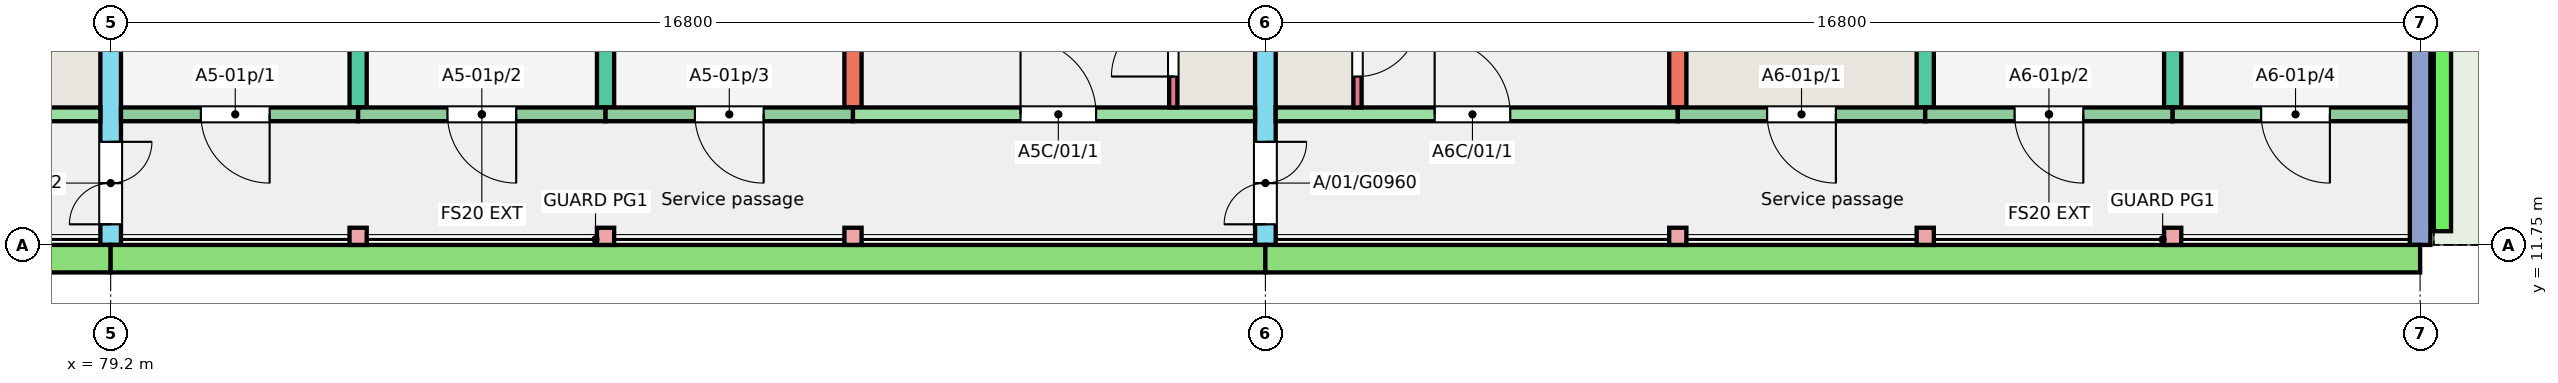
"""IFC4 building model, lengths in metres.
Left out: names, types, materials, properties, quantities, classifications, styles, units other than length and angle.
Written with IfcOpenShell. Run it as: python <this file> out.ifc"""

import sys

from ifc_helpers import new_model, si_unit, direction, frame, frame_2d, origin, origin_2d, place, context, subcontext, project, spatial, rectangle, extrude, element, fill, save


model = new_model("IFC4")
c1 = context("Model", 3, precision=1e-05, world=origin(), true_north=direction((0.0, 1.0)))
c2 = subcontext(c1, "Body", "Model", "MODEL_VIEW")
j1 = project(units=[si_unit("LENGTHUNIT", "METRE"), si_unit("PLANEANGLEUNIT", "RADIAN")], contexts=[c1])
p1 = place(None, origin())
s1 = spatial("IfcSite", under=j1, at=p1, CompositionType="ELEMENT")
p2 = place(p1, origin())
s2 = spatial("IfcBuilding", under=s1, at=p2, CompositionType="ELEMENT")
p3 = place(p2, frame((0.0, 0.0, 3.0)))
s3 = spatial("IfcBuildingStorey", under=s2, at=p3, CompositionType="ELEMENT", Elevation=3.0)
p4 = place(p3, frame((79.2, 11.75, 0.0), z_axis=(0.0, 0.0, 1.0), x_axis=(0.0, 1.0, 0.0)))
e1 = element("IfcWall", 1, at=p4, inside=s3, PredefinedType="SHEAR", context=c2, shape_type="SweptSolid", body=[
    extrude(rectangle(XDim=11.0, YDim=0.3, at=frame_2d((5.5, 0.0))), origin(), (0.0, 0.0, 1.0), 3.0),
])
p5 = place(p4, frame((0.3, 0.0, 0.0)))
e2 = element("IfcOpeningElement", 2, at=p5, cuts=e1, PredefinedType="OPENING", context=c2, shape_type="SweptSolid", body=[
    extrude(rectangle(XDim=1.2, YDim=2.1, at=frame_2d((0.6, 1.05))), frame((0.0, 0.16, 0.0), z_axis=(0.0, -1.0, 0.0), x_axis=(1.0, 0.0, 0.0)), (0.0, 0.0, 1.0), 0.32),
])
for number, where, z_axis, x_axis in (
    (3, (82.8, 13.75, 0.0), (0.0, 0.0, 1.0), (0.0, 1.0, 0.0)),
    (4, (86.4, 13.75, 0.0), (0.0, 0.0, 1.0), (0.0, 1.0, 0.0)),
    (5, (90.0, 13.75, 0.0), (0.0, 0.0, 1.0), (0.0, 1.0, 0.0)),
):
    element("IfcWall", number, at=place(p3, frame(where, z_axis=z_axis, x_axis=x_axis)), inside=s3, PredefinedType="SHEAR", context=c2, shape_type="SweptSolid", body=[
        extrude(rectangle(XDim=9.0, YDim=0.25, at=frame_2d((4.5, 0.0))), origin(), (0.0, 0.0, 1.0), 3.0),
    ])
p6 = place(p3, frame((96.0, 11.75, 0.0), z_axis=(0.0, 0.0, 1.0), x_axis=(0.0, 1.0, 0.0)))
e6 = element("IfcWall", 6, at=p6, inside=s3, PredefinedType="SHEAR", context=c2, shape_type="SweptSolid", body=[
    extrude(rectangle(XDim=11.0, YDim=0.3, at=frame_2d((5.5, 0.0))), origin(), (0.0, 0.0, 1.0), 3.0),
])
p7 = place(p6, frame((0.3, 0.0, 0.0)))
e7 = element("IfcOpeningElement", 7, at=p7, cuts=e6, PredefinedType="OPENING", context=c2, shape_type="SweptSolid", body=[
    extrude(rectangle(XDim=1.2, YDim=2.1, at=frame_2d((0.6, 1.05))), frame((0.0, 0.16, 0.0), z_axis=(0.0, -1.0, 0.0), x_axis=(1.0, 0.0, 0.0)), (0.0, 0.0, 1.0), 0.32),
])
for number, where, z_axis, x_axis in (
    (8, (102.0, 13.75, 0.0), (0.0, 0.0, 1.0), (0.0, 1.0, 0.0)),
    (9, (105.6, 13.75, 0.0), (0.0, 0.0, 1.0), (0.0, 1.0, 0.0)),
    (10, (109.2, 13.75, 0.0), (0.0, 0.0, 1.0), (0.0, 1.0, 0.0)),
):
    element("IfcWall", number, at=place(p3, frame(where, z_axis=z_axis, x_axis=x_axis)), inside=s3, PredefinedType="SHEAR", context=c2, shape_type="SweptSolid", body=[
        extrude(rectangle(XDim=9.0, YDim=0.25, at=frame_2d((4.5, 0.0))), origin(), (0.0, 0.0, 1.0), 3.0),
    ])
p8 = place(p3, frame((112.8, 11.75, 0.0), z_axis=(0.0, 0.0, 1.0), x_axis=(0.0, 1.0, 0.0)))
e11 = element("IfcWall", 11, at=p8, inside=s3, PredefinedType="SHEAR", context=c2, shape_type="SweptSolid", body=[
    extrude(rectangle(XDim=11.0, YDim=0.3, at=frame_2d((5.5, 0.0))), origin(), (0.0, 0.0, 1.0), 3.0),
])
p9 = place(p3, frame((73.2, 13.65, 0.0), z_axis=(0.0, 0.0, 1.0), x_axis=(1.0, 0.0, 0.0)))
e12 = element("IfcWall", 12, at=p9, inside=s3, PredefinedType="SHEAR", context=c2, shape_type="SweptSolid", body=[
    extrude(rectangle(XDim=5.85, YDim=0.2, at=frame_2d((2.925, 0.0))), origin(), (0.0, 0.0, 1.0), 3.0),
])
p10 = place(p9, frame((2.438, 0.0, 0.0)))
e13 = element("IfcOpeningElement", 13, at=p10, cuts=e12, PredefinedType="OPENING", context=c2, shape_type="SweptSolid", body=[
    extrude(rectangle(XDim=1.1, YDim=2.1, at=frame_2d((0.55, 1.05))), frame((0.0, 0.11, 0.0), z_axis=(0.0, -1.0, 0.0), x_axis=(1.0, 0.0, 0.0)), (0.0, 0.0, 1.0), 0.22),
])
p11 = place(p3, frame((79.35, 13.65, 0.0), z_axis=(0.0, 0.0, 1.0), x_axis=(1.0, 0.0, 0.0)))
e14 = element("IfcWall", 14, at=p11, inside=s3, PredefinedType="SOLIDWALL", context=c2, shape_type="SweptSolid", body=[
    extrude(rectangle(XDim=3.45, YDim=0.2, at=frame_2d((1.725, 0.0))), origin(), (0.0, 0.0, 1.0), 3.0),
])
p12 = place(p11, frame((1.163, 0.0, 0.0)))
e15 = element("IfcOpeningElement", 15, at=p12, cuts=e14, PredefinedType="OPENING", context=c2, shape_type="SweptSolid", body=[
    extrude(rectangle(XDim=1.0, YDim=2.1, at=frame_2d((0.5, 1.05))), frame((0.0, 0.11, 0.0), z_axis=(0.0, -1.0, 0.0), x_axis=(1.0, 0.0, 0.0)), (0.0, 0.0, 1.0), 0.22),
])
p13 = place(p3, frame((82.8, 13.65, 0.0), z_axis=(0.0, 0.0, 1.0), x_axis=(1.0, 0.0, 0.0)))
e16 = element("IfcWall", 16, at=p13, inside=s3, PredefinedType="SOLIDWALL", context=c2, shape_type="SweptSolid", body=[
    extrude(rectangle(XDim=3.6, YDim=0.2, at=frame_2d((1.8, 0.0))), origin(), (0.0, 0.0, 1.0), 3.0),
])
p14 = place(p13, frame((1.3, 0.0, 0.0)))
e17 = element("IfcOpeningElement", 17, at=p14, cuts=e16, PredefinedType="OPENING", context=c2, shape_type="SweptSolid", body=[
    extrude(rectangle(XDim=1.0, YDim=2.1, at=frame_2d((0.5, 1.05))), frame((0.0, 0.11, 0.0), z_axis=(0.0, -1.0, 0.0), x_axis=(1.0, 0.0, 0.0)), (0.0, 0.0, 1.0), 0.22),
])
p15 = place(p3, frame((86.4, 13.65, 0.0), z_axis=(0.0, 0.0, 1.0), x_axis=(1.0, 0.0, 0.0)))
e18 = element("IfcWall", 18, at=p15, inside=s3, PredefinedType="SOLIDWALL", context=c2, shape_type="SweptSolid", body=[
    extrude(rectangle(XDim=3.6, YDim=0.2, at=frame_2d((1.8, 0.0))), origin(), (0.0, 0.0, 1.0), 3.0),
])
p16 = place(p15, frame((1.3, 0.0, 0.0)))
e19 = element("IfcOpeningElement", 19, at=p16, cuts=e18, PredefinedType="OPENING", context=c2, shape_type="SweptSolid", body=[
    extrude(rectangle(XDim=1.0, YDim=2.1, at=frame_2d((0.5, 1.05))), frame((0.0, 0.11, 0.0), z_axis=(0.0, -1.0, 0.0), x_axis=(1.0, 0.0, 0.0)), (0.0, 0.0, 1.0), 0.22),
])
p17 = place(p3, frame((90.0, 13.65, 0.0), z_axis=(0.0, 0.0, 1.0), x_axis=(1.0, 0.0, 0.0)))
e20 = element("IfcWall", 20, at=p17, inside=s3, PredefinedType="SHEAR", context=c2, shape_type="SweptSolid", body=[
    extrude(rectangle(XDim=5.85, YDim=0.2, at=frame_2d((2.925, 0.0))), origin(), (0.0, 0.0, 1.0), 3.0),
])
p18 = place(p17, frame((2.438, 0.0, 0.0)))
e21 = element("IfcOpeningElement", 21, at=p18, cuts=e20, PredefinedType="OPENING", context=c2, shape_type="SweptSolid", body=[
    extrude(rectangle(XDim=1.1, YDim=2.1, at=frame_2d((0.55, 1.05))), frame((0.0, 0.11, 0.0), z_axis=(0.0, -1.0, 0.0), x_axis=(1.0, 0.0, 0.0)), (0.0, 0.0, 1.0), 0.22),
])
p19 = place(p3, frame((94.66, 13.75, 0.0), z_axis=(0.0, 0.0, 1.0), x_axis=(0.0, 1.0, 0.0)))
e22 = element("IfcWall", 22, at=p19, inside=s3, PredefinedType="SHEAR", context=c2, shape_type="SweptSolid", body=[
    extrude(rectangle(XDim=1.72, YDim=0.12, at=frame_2d((0.86, 0.0))), origin(), (0.0, 0.0, 1.0), 3.0),
])
p20 = place(p19, frame((0.45, 0.0, 0.0)))
e23 = element("IfcOpeningElement", 23, at=p20, cuts=e22, PredefinedType="OPENING", context=c2, shape_type="SweptSolid", body=[
    extrude(rectangle(XDim=0.9, YDim=2.1, at=frame_2d((0.45, 1.05))), frame((0.0, 0.07, 0.0), z_axis=(0.0, -1.0, 0.0), x_axis=(1.0, 0.0, 0.0)), (0.0, 0.0, 1.0), 0.14),
])
p21 = place(p3, frame((96.15, 13.65, 0.0), z_axis=(0.0, 0.0, 1.0), x_axis=(1.0, 0.0, 0.0)))
e24 = element("IfcWall", 24, at=p21, inside=s3, PredefinedType="SHEAR", context=c2, shape_type="SweptSolid", body=[
    extrude(rectangle(XDim=5.85, YDim=0.2, at=frame_2d((2.925, 0.0))), origin(), (0.0, 0.0, 1.0), 3.0),
])
p22 = place(p21, frame((2.312, 0.0, 0.0)))
e25 = element("IfcOpeningElement", 25, at=p22, cuts=e24, PredefinedType="OPENING", context=c2, shape_type="SweptSolid", body=[
    extrude(rectangle(XDim=1.1, YDim=2.1, at=frame_2d((0.55, 1.05))), frame((0.0, 0.11, 0.0), z_axis=(0.0, -1.0, 0.0), x_axis=(1.0, 0.0, 0.0)), (0.0, 0.0, 1.0), 0.22),
])
p23 = place(p3, frame((97.34, 13.75, 0.0), z_axis=(0.0, 0.0, 1.0), x_axis=(0.0, 1.0, 0.0)))
e26 = element("IfcWall", 26, at=p23, inside=s3, PredefinedType="SHEAR", context=c2, shape_type="SweptSolid", body=[
    extrude(rectangle(XDim=1.72, YDim=0.12, at=frame_2d((0.86, 0.0))), origin(), (0.0, 0.0, 1.0), 3.0),
])
p24 = place(p23, frame((0.45, 0.0, 0.0)))
e27 = element("IfcOpeningElement", 27, at=p24, cuts=e26, PredefinedType="OPENING", context=c2, shape_type="SweptSolid", body=[
    extrude(rectangle(XDim=0.9, YDim=2.1, at=frame_2d((0.45, 1.05))), frame((0.0, 0.07, 0.0), z_axis=(0.0, -1.0, 0.0), x_axis=(1.0, 0.0, 0.0)), (0.0, 0.0, 1.0), 0.14),
])
p25 = place(p3, frame((102.0, 13.65, 0.0), z_axis=(0.0, 0.0, 1.0), x_axis=(1.0, 0.0, 0.0)))
e28 = element("IfcWall", 28, at=p25, inside=s3, PredefinedType="SOLIDWALL", context=c2, shape_type="SweptSolid", body=[
    extrude(rectangle(XDim=3.6, YDim=0.2, at=frame_2d((1.8, 0.0))), origin(), (0.0, 0.0, 1.0), 3.0),
])
p26 = place(p25, frame((1.3, 0.0, 0.0)))
e29 = element("IfcOpeningElement", 29, at=p26, cuts=e28, PredefinedType="OPENING", context=c2, shape_type="SweptSolid", body=[
    extrude(rectangle(XDim=1.0, YDim=2.1, at=frame_2d((0.5, 1.05))), frame((0.0, 0.11, 0.0), z_axis=(0.0, -1.0, 0.0), x_axis=(1.0, 0.0, 0.0)), (0.0, 0.0, 1.0), 0.22),
])
p27 = place(p3, frame((105.6, 13.65, 0.0), z_axis=(0.0, 0.0, 1.0), x_axis=(1.0, 0.0, 0.0)))
e30 = element("IfcWall", 30, at=p27, inside=s3, PredefinedType="SOLIDWALL", context=c2, shape_type="SweptSolid", body=[
    extrude(rectangle(XDim=3.6, YDim=0.2, at=frame_2d((1.8, 0.0))), origin(), (0.0, 0.0, 1.0), 3.0),
])
p28 = place(p27, frame((1.3, 0.0, 0.0)))
e31 = element("IfcOpeningElement", 31, at=p28, cuts=e30, PredefinedType="OPENING", context=c2, shape_type="SweptSolid", body=[
    extrude(rectangle(XDim=1.0, YDim=2.1, at=frame_2d((0.5, 1.05))), frame((0.0, 0.11, 0.0), z_axis=(0.0, -1.0, 0.0), x_axis=(1.0, 0.0, 0.0)), (0.0, 0.0, 1.0), 0.22),
])
p29 = place(p3, frame((109.2, 13.65, 0.0), z_axis=(0.0, 0.0, 1.0), x_axis=(1.0, 0.0, 0.0)))
e32 = element("IfcWall", 32, at=p29, inside=s3, PredefinedType="SOLIDWALL", context=c2, shape_type="SweptSolid", body=[
    extrude(rectangle(XDim=3.45, YDim=0.2, at=frame_2d((1.725, 0.0))), origin(), (0.0, 0.0, 1.0), 3.0),
])
p30 = place(p29, frame((1.288, 0.0, 0.0)))
e33 = element("IfcOpeningElement", 33, at=p30, cuts=e32, PredefinedType="OPENING", context=c2, shape_type="SweptSolid", body=[
    extrude(rectangle(XDim=1.0, YDim=2.1, at=frame_2d((0.5, 1.05))), frame((0.0, 0.11, 0.0), z_axis=(0.0, -1.0, 0.0), x_axis=(1.0, 0.0, 0.0)), (0.0, 0.0, 1.0), 0.22),
])
for number, where, z_axis, x_axis in (
    (34, (82.8, 11.875, 0.0), (0.0, 0.0, 1.0), (1.0, 0.0, 0.0)),
    (35, (86.4, 11.875, 0.0), (0.0, 0.0, 1.0), (1.0, 0.0, 0.0)),
    (36, (90.0, 11.875, 0.0), (0.0, 0.0, 1.0), (1.0, 0.0, 0.0)),
    (37, (102.0, 11.875, 0.0), (0.0, 0.0, 1.0), (1.0, 0.0, 0.0)),
    (38, (105.6, 11.875, 0.0), (0.0, 0.0, 1.0), (1.0, 0.0, 0.0)),
    (39, (109.2, 11.875, 0.0), (0.0, 0.0, 1.0), (1.0, 0.0, 0.0)),
):
    element("IfcColumn", number, at=place(p3, frame(where, z_axis=z_axis, x_axis=x_axis)), inside=s3, PredefinedType="COLUMN", context=c2, shape_type="SweptSolid", body=[
        extrude(rectangle(XDim=0.25, YDim=0.25, at=origin_2d()), origin(), (0.0, 0.0, 1.0), 3.0),
    ])
for number, where, z_axis, x_axis in (
    (40, (62.4, 11.55, 0.0), (0.0, 0.0, 1.0), (1.0, 0.0, 0.0)),
    (41, (79.2, 11.55, 0.0), (0.0, 0.0, 1.0), (1.0, 0.0, 0.0)),
    (42, (96.0, 11.55, 0.0), (0.0, 0.0, 1.0), (1.0, 0.0, 0.0)),
):
    element("IfcWall", number, at=place(p3, frame(where, z_axis=z_axis, x_axis=x_axis)), inside=s3, PredefinedType="SOLIDWALL", context=c2, shape_type="SweptSolid", body=[
        extrude(rectangle(XDim=16.8, YDim=0.4, at=frame_2d((8.4, 0.0))), origin(), (0.0, 0.0, 1.0), 2.85),
    ])
p31 = place(p2, origin())
s4 = spatial("IfcBuildingStorey", under=s2, at=p31, CompositionType="ELEMENT", Elevation=0.0)
p32 = place(p31, frame((112.8, 11.55, -0.25), z_axis=(0.0, 0.0, 1.0), x_axis=(1.0, 0.0, 0.0)))
e43 = element("IfcWall", 43, at=p32, inside=s4, PredefinedType="SOLIDWALL", context=c2, shape_type="SweptSolid", body=[
    extrude(rectangle(XDim=14.0, YDim=0.4, at=frame_2d((7.0, 0.0))), origin(), (0.0, 0.0, 1.0), 6.25),
])
p33 = place(p3, frame((113.125, 11.95, 0.0), z_axis=(0.0, 0.0, 1.0), x_axis=(0.0, 1.0, 0.0)))
e44 = element("IfcWall", 44, at=p33, inside=s3, PredefinedType="PARAPET", context=c2, shape_type="SweptSolid", body=[
    extrude(rectangle(XDim=10.5, YDim=0.25, at=frame_2d((5.25, 0.0))), origin(), (0.0, 0.0, 1.0), 1.1),
])
p34 = place(p12, origin())
e45 = element("IfcDoor", 45, at=p34, inside=s3, OperationType="SINGLE_SWING_RIGHT", PredefinedType="DOOR", context=c2, shape_type="SweptSolid", body=[
    extrude(rectangle(XDim=1.0, YDim=2.1, at=frame_2d((0.5, 1.05))), frame((0.0, 0.025, 0.0), z_axis=(0.0, -1.0, 0.0), x_axis=(1.0, 0.0, 0.0)), (0.0, 0.0, 1.0), 0.05),
])
fill(e15, e45)
p35 = place(p14, origin())
e46 = element("IfcDoor", 46, at=p35, inside=s3, OperationType="SINGLE_SWING_RIGHT", PredefinedType="DOOR", context=c2, shape_type="SweptSolid", body=[
    extrude(rectangle(XDim=1.0, YDim=2.1, at=frame_2d((0.5, 1.05))), frame((0.0, 0.025, 0.0), z_axis=(0.0, -1.0, 0.0), x_axis=(1.0, 0.0, 0.0)), (0.0, 0.0, 1.0), 0.05),
])
fill(e17, e46)
p36 = place(p16, origin())
e47 = element("IfcDoor", 47, at=p36, inside=s3, OperationType="SINGLE_SWING_RIGHT", PredefinedType="DOOR", context=c2, shape_type="SweptSolid", body=[
    extrude(rectangle(XDim=1.0, YDim=2.1, at=frame_2d((0.5, 1.05))), frame((0.0, 0.025, 0.0), z_axis=(0.0, -1.0, 0.0), x_axis=(1.0, 0.0, 0.0)), (0.0, 0.0, 1.0), 0.05),
])
fill(e19, e47)
p37 = place(p26, origin())
e48 = element("IfcDoor", 48, at=p37, inside=s3, OperationType="SINGLE_SWING_RIGHT", PredefinedType="DOOR", context=c2, shape_type="SweptSolid", body=[
    extrude(rectangle(XDim=1.0, YDim=2.1, at=frame_2d((0.5, 1.05))), frame((0.0, 0.025, 0.0), z_axis=(0.0, -1.0, 0.0), x_axis=(1.0, 0.0, 0.0)), (0.0, 0.0, 1.0), 0.05),
])
fill(e29, e48)
p38 = place(p28, origin())
e49 = element("IfcDoor", 49, at=p38, inside=s3, OperationType="SINGLE_SWING_RIGHT", PredefinedType="DOOR", context=c2, shape_type="SweptSolid", body=[
    extrude(rectangle(XDim=1.0, YDim=2.1, at=frame_2d((0.5, 1.05))), frame((0.0, 0.025, 0.0), z_axis=(0.0, -1.0, 0.0), x_axis=(1.0, 0.0, 0.0)), (0.0, 0.0, 1.0), 0.05),
])
fill(e31, e49)
p39 = place(p30, origin())
e50 = element("IfcDoor", 50, at=p39, inside=s3, OperationType="SINGLE_SWING_RIGHT", PredefinedType="DOOR", context=c2, shape_type="SweptSolid", body=[
    extrude(rectangle(XDim=1.0, YDim=2.1, at=frame_2d((0.5, 1.05))), frame((0.0, 0.025, 0.0), z_axis=(0.0, -1.0, 0.0), x_axis=(1.0, 0.0, 0.0)), (0.0, 0.0, 1.0), 0.05),
])
fill(e33, e50)
p40 = place(p18, origin())
e51 = element("IfcDoor", 51, at=p40, inside=s3, OperationType="SINGLE_SWING_LEFT", PredefinedType="DOOR", context=c2, shape_type="SweptSolid", body=[
    extrude(rectangle(XDim=1.1, YDim=2.1, at=frame_2d((0.55, 1.05))), frame((0.0, 0.025, 0.0), z_axis=(0.0, -1.0, 0.0), x_axis=(1.0, 0.0, 0.0)), (0.0, 0.0, 1.0), 0.05),
])
fill(e21, e51)
p41 = place(p20, origin())
e52 = element("IfcDoor", 52, at=p41, inside=s3, OperationType="SINGLE_SWING_LEFT", PredefinedType="DOOR", context=c2, shape_type="SweptSolid", body=[
    extrude(rectangle(XDim=0.9, YDim=2.1, at=frame_2d((0.45, 1.05))), frame((0.0, 0.025, 0.0), z_axis=(0.0, -1.0, 0.0), x_axis=(1.0, 0.0, 0.0)), (0.0, 0.0, 1.0), 0.05),
])
fill(e23, e52)
p42 = place(p22, origin())
e53 = element("IfcDoor", 53, at=p42, inside=s3, OperationType="SINGLE_SWING_LEFT", PredefinedType="DOOR", context=c2, shape_type="SweptSolid", body=[
    extrude(rectangle(XDim=1.1, YDim=2.1, at=frame_2d((0.55, 1.05))), frame((0.0, 0.025, 0.0), z_axis=(0.0, -1.0, 0.0), x_axis=(1.0, 0.0, 0.0)), (0.0, 0.0, 1.0), 0.05),
])
fill(e25, e53)
p43 = place(p24, origin())
e54 = element("IfcDoor", 54, at=p43, inside=s3, OperationType="SINGLE_SWING_RIGHT", PredefinedType="DOOR", context=c2, shape_type="SweptSolid", body=[
    extrude(rectangle(XDim=0.9, YDim=2.1, at=frame_2d((0.45, 1.05))), frame((0.0, 0.025, 0.0), z_axis=(0.0, -1.0, 0.0), x_axis=(1.0, 0.0, 0.0)), (0.0, 0.0, 1.0), 0.05),
])
fill(e27, e54)
p44 = place(p5, origin())
e55 = element("IfcDoor", 55, at=p44, inside=s3, OperationType="DOUBLE_DOOR_SINGLE_SWING", PredefinedType="DOOR", context=c2, shape_type="SweptSolid", body=[
    extrude(rectangle(XDim=1.2, YDim=2.1, at=frame_2d((0.6, 1.05))), frame((0.0, 0.025, 0.0), z_axis=(0.0, -1.0, 0.0), x_axis=(1.0, 0.0, 0.0)), (0.0, 0.0, 1.0), 0.05),
])
fill(e2, e55)
p45 = place(p7, origin())
e56 = element("IfcDoor", 56, at=p45, inside=s3, OperationType="DOUBLE_DOOR_SINGLE_SWING", PredefinedType="DOOR", context=c2, shape_type="SweptSolid", body=[
    extrude(rectangle(XDim=1.2, YDim=2.1, at=frame_2d((0.6, 1.05))), frame((0.0, 0.025, 0.0), z_axis=(0.0, -1.0, 0.0), x_axis=(1.0, 0.0, 0.0)), (0.0, 0.0, 1.0), 0.05),
])
fill(e7, e56)
save(model, sys.argv[1])
